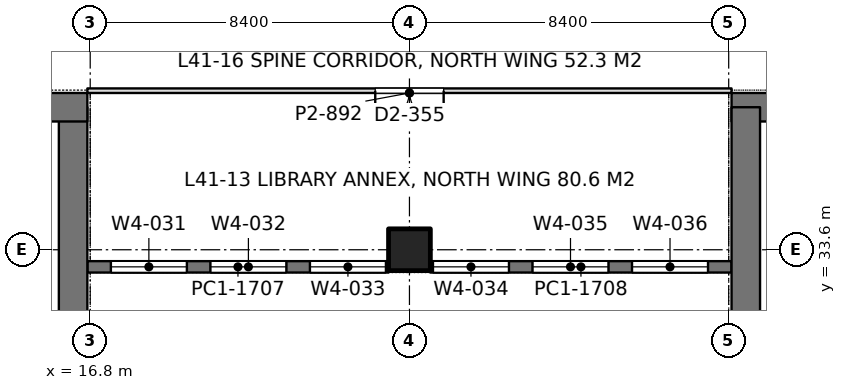
"""IFC4 building model, lengths in metres.
Left out: names, types, materials, properties, quantities, classifications, styles, units other than length and angle.
Written with IfcOpenShell. Run it as: python <this file> out.ifc"""

import sys

from ifc_helpers import new_model, si_unit, direction, frame, frame_2d, origin, origin_2d, place, context, subcontext, project, spatial, rectangle, extrude, element, fill, save


model = new_model("IFC4")
c1 = context("Model", 3, precision=1e-05, world=origin(), true_north=direction((0.0, 1.0)))
c2 = subcontext(c1, "Body", "Model", "MODEL_VIEW")
j1 = project(units=[si_unit("LENGTHUNIT", "METRE"), si_unit("PLANEANGLEUNIT", "RADIAN")], contexts=[c1])
p1 = place(None, origin())
s1 = spatial("IfcSite", under=j1, at=p1, CompositionType="ELEMENT")
p2 = place(p1, origin())
s2 = spatial("IfcBuilding", under=s1, at=p2, CompositionType="ELEMENT")
p3 = place(p2, frame((0.0, 0.0, 181.8)))
s3 = spatial("IfcBuildingStorey", under=s2, at=p3, CompositionType="ELEMENT", Elevation=181.8)
p4 = place(p3, frame((25.2, 33.6, 0.0), z_axis=(0.0, 0.0, 1.0), x_axis=(1.0, 0.0, 0.0)))
e1 = element("IfcColumn", 1, at=p4, inside=s3, PredefinedType="COLUMN", context=c2, shape_type="SweptSolid", body=[
    extrude(rectangle(XDim=1.1, YDim=1.1, at=origin_2d()), origin(), (0.0, 0.0, 1.0), 4.2),
])
p5 = place(p3, frame((-1.125, 37.35, 0.0), z_axis=(0.0, 0.0, 1.0), x_axis=(1.0, 0.0, 0.0)))
e2 = element("IfcWall", 2, at=p5, inside=s3, PredefinedType="SHEAR", context=c2, shape_type="SweptSolid", body=[
    extrude(rectangle(XDim=17.85, YDim=0.75, at=frame_2d((8.925, 0.0))), origin(), (0.0, 0.0, 1.0), 4.2),
])
p6 = place(p5, frame((8.875, 0.0, 0.0)))
e3 = element("IfcOpeningElement", 3, at=p6, cuts=e2, PredefinedType="OPENING", context=c2, shape_type="SweptSolid", body=[
    extrude(rectangle(XDim=1.8, YDim=2.4, at=frame_2d((0.9, 1.2))), frame((0.0, 0.385, 0.0), z_axis=(0.0, -1.0, 0.0), x_axis=(1.0, 0.0, 0.0)), (0.0, 0.0, 1.0), 0.77),
])
p7 = place(p3, frame((16.35, 27.8, 0.0), z_axis=(0.0, 0.0, 1.0), x_axis=(0.0, 1.0, 0.0)))
e4 = element("IfcWall", 4, at=p7, inside=s3, PredefinedType="SHEAR", context=c2, shape_type="SweptSolid", body=[
    extrude(rectangle(XDim=9.55, YDim=0.75, at=frame_2d((4.775, 0.0))), origin(), (0.0, 0.0, 1.0), 4.2),
])
p8 = place(p3, frame((33.675, 37.35, 0.0), z_axis=(0.0, 0.0, 1.0), x_axis=(1.0, 0.0, 0.0)))
e5 = element("IfcWall", 5, at=p8, inside=s3, PredefinedType="SHEAR", context=c2, shape_type="SweptSolid", body=[
    extrude(rectangle(XDim=17.85, YDim=0.75, at=frame_2d((8.925, 0.0))), origin(), (0.0, 0.0, 1.0), 4.2),
])
p9 = place(p8, frame((7.175, 0.0, 0.0)))
e6 = element("IfcOpeningElement", 6, at=p9, cuts=e5, PredefinedType="OPENING", context=c2, shape_type="SweptSolid", body=[
    extrude(rectangle(XDim=1.8, YDim=2.4, at=frame_2d((0.9, 1.2))), frame((0.0, 0.385, 0.0), z_axis=(0.0, -1.0, 0.0), x_axis=(1.0, 0.0, 0.0)), (0.0, 0.0, 1.0), 0.77),
])
p10 = place(p3, frame((34.05, 27.8, 0.0), z_axis=(0.0, 0.0, 1.0), x_axis=(0.0, 1.0, 0.0)))
e7 = element("IfcWall", 7, at=p10, inside=s3, PredefinedType="SHEAR", context=c2, shape_type="SweptSolid", body=[
    extrude(rectangle(XDim=9.55, YDim=0.75, at=frame_2d((4.775, 0.0))), origin(), (0.0, 0.0, 1.0), 4.2),
])
p11 = place(p3, frame((16.725, 33.15, 0.0), z_axis=(0.0, 0.0, 1.0), x_axis=(1.0, 0.0, 0.0)))
e8 = element("IfcWall", 8, at=p11, inside=s3, PredefinedType="SOLIDWALL", context=c2, shape_type="SweptSolid", body=[
    extrude(rectangle(XDim=7.925, YDim=0.3, at=frame_2d((3.962, 0.0))), origin(), (0.0, 0.0, 1.0), 4.05),
])
p12 = place(p11, frame((0.619, 0.0, 0.9)))
e9 = element("IfcOpeningElement", 9, at=p12, cuts=e8, PredefinedType="OPENING", context=c2, shape_type="SweptSolid", body=[
    extrude(rectangle(XDim=2.0, YDim=1.9, at=frame_2d((1.0, 0.95))), frame((0.0, 0.16, 0.0), z_axis=(0.0, -1.0, 0.0), x_axis=(1.0, 0.0, 0.0)), (0.0, 0.0, 1.0), 0.32),
])
p13 = place(p11, frame((3.238, 0.0, 0.9)))
e10 = element("IfcOpeningElement", 10, at=p13, cuts=e8, PredefinedType="OPENING", context=c2, shape_type="SweptSolid", body=[
    extrude(rectangle(XDim=2.0, YDim=1.9, at=frame_2d((1.0, 0.95))), frame((0.0, 0.16, 0.0), z_axis=(0.0, -1.0, 0.0), x_axis=(1.0, 0.0, 0.0)), (0.0, 0.0, 1.0), 0.32),
])
p14 = place(p11, frame((5.856, 0.0, 0.9)))
e11 = element("IfcOpeningElement", 11, at=p14, cuts=e8, PredefinedType="OPENING", context=c2, shape_type="SweptSolid", body=[
    extrude(rectangle(XDim=2.0, YDim=1.9, at=frame_2d((1.0, 0.95))), frame((0.0, 0.16, 0.0), z_axis=(0.0, -1.0, 0.0), x_axis=(1.0, 0.0, 0.0)), (0.0, 0.0, 1.0), 0.32),
])
p15 = place(p3, frame((25.75, 33.15, 0.0), z_axis=(0.0, 0.0, 1.0), x_axis=(1.0, 0.0, 0.0)))
e12 = element("IfcWall", 12, at=p15, inside=s3, PredefinedType="SOLIDWALL", context=c2, shape_type="SweptSolid", body=[
    extrude(rectangle(XDim=7.925, YDim=0.3, at=frame_2d((3.962, 0.0))), origin(), (0.0, 0.0, 1.0), 4.05),
])
p16 = place(p15, frame((0.069, 0.0, 0.9)))
e13 = element("IfcOpeningElement", 13, at=p16, cuts=e12, PredefinedType="OPENING", context=c2, shape_type="SweptSolid", body=[
    extrude(rectangle(XDim=2.0, YDim=1.9, at=frame_2d((1.0, 0.95))), frame((0.0, 0.16, 0.0), z_axis=(0.0, -1.0, 0.0), x_axis=(1.0, 0.0, 0.0)), (0.0, 0.0, 1.0), 0.32),
])
p17 = place(p15, frame((2.688, 0.0, 0.9)))
e14 = element("IfcOpeningElement", 14, at=p17, cuts=e12, PredefinedType="OPENING", context=c2, shape_type="SweptSolid", body=[
    extrude(rectangle(XDim=2.0, YDim=1.9, at=frame_2d((1.0, 0.95))), frame((0.0, 0.16, 0.0), z_axis=(0.0, -1.0, 0.0), x_axis=(1.0, 0.0, 0.0)), (0.0, 0.0, 1.0), 0.32),
])
p18 = place(p15, frame((5.306, 0.0, 0.9)))
e15 = element("IfcOpeningElement", 15, at=p18, cuts=e12, PredefinedType="OPENING", context=c2, shape_type="SweptSolid", body=[
    extrude(rectangle(XDim=2.0, YDim=1.9, at=frame_2d((1.0, 0.95))), frame((0.0, 0.16, 0.0), z_axis=(0.0, -1.0, 0.0), x_axis=(1.0, 0.0, 0.0)), (0.0, 0.0, 1.0), 0.32),
])
p19 = place(p3, frame((16.725, 37.785, 0.0), z_axis=(0.0, 0.0, 1.0), x_axis=(1.0, 0.0, 0.0)))
e16 = element("IfcWall", 16, at=p19, inside=s3, PredefinedType="PARTITIONING", context=c2, shape_type="SweptSolid", body=[
    extrude(rectangle(XDim=16.95, YDim=0.12, at=frame_2d((8.475, 0.0))), origin(), (0.0, 0.0, 1.0), 3.55),
])
p20 = place(p19, frame((7.575, 0.0, 0.0)))
e17 = element("IfcOpeningElement", 17, at=p20, cuts=e16, PredefinedType="OPENING", context=c2, shape_type="SweptSolid", body=[
    extrude(rectangle(XDim=1.8, YDim=2.2, at=frame_2d((0.9, 1.1))), frame((0.0, 0.07, 0.0), z_axis=(0.0, -1.0, 0.0), x_axis=(1.0, 0.0, 0.0)), (0.0, 0.0, 1.0), 0.14),
])
p21 = place(p12, origin())
e18 = element("IfcWindow", 18, at=p21, inside=s3, PartitioningType="SINGLE_PANEL", PredefinedType="WINDOW", context=c2, shape_type="SweptSolid", body=[
    extrude(rectangle(XDim=2.0, YDim=1.9, at=frame_2d((1.0, 0.95))), frame((0.0, 0.03, 0.0), z_axis=(0.0, -1.0, 0.0), x_axis=(1.0, 0.0, 0.0)), (0.0, 0.0, 1.0), 0.06),
])
fill(e9, e18)
p22 = place(p13, origin())
e19 = element("IfcWindow", 19, at=p22, inside=s3, PartitioningType="SINGLE_PANEL", PredefinedType="WINDOW", context=c2, shape_type="SweptSolid", body=[
    extrude(rectangle(XDim=2.0, YDim=1.9, at=frame_2d((1.0, 0.95))), frame((0.0, 0.03, 0.0), z_axis=(0.0, -1.0, 0.0), x_axis=(1.0, 0.0, 0.0)), (0.0, 0.0, 1.0), 0.06),
])
fill(e10, e19)
p23 = place(p14, origin())
e20 = element("IfcWindow", 20, at=p23, inside=s3, PartitioningType="SINGLE_PANEL", PredefinedType="WINDOW", context=c2, shape_type="SweptSolid", body=[
    extrude(rectangle(XDim=2.0, YDim=1.9, at=frame_2d((1.0, 0.95))), frame((0.0, 0.03, 0.0), z_axis=(0.0, -1.0, 0.0), x_axis=(1.0, 0.0, 0.0)), (0.0, 0.0, 1.0), 0.06),
])
fill(e11, e20)
p24 = place(p16, origin())
e21 = element("IfcWindow", 21, at=p24, inside=s3, PartitioningType="SINGLE_PANEL", PredefinedType="WINDOW", context=c2, shape_type="SweptSolid", body=[
    extrude(rectangle(XDim=2.0, YDim=1.9, at=frame_2d((1.0, 0.95))), frame((0.0, 0.03, 0.0), z_axis=(0.0, -1.0, 0.0), x_axis=(1.0, 0.0, 0.0)), (0.0, 0.0, 1.0), 0.06),
])
fill(e13, e21)
p25 = place(p17, origin())
e22 = element("IfcWindow", 22, at=p25, inside=s3, PartitioningType="SINGLE_PANEL", PredefinedType="WINDOW", context=c2, shape_type="SweptSolid", body=[
    extrude(rectangle(XDim=2.0, YDim=1.9, at=frame_2d((1.0, 0.95))), frame((0.0, 0.03, 0.0), z_axis=(0.0, -1.0, 0.0), x_axis=(1.0, 0.0, 0.0)), (0.0, 0.0, 1.0), 0.06),
])
fill(e14, e22)
p26 = place(p18, origin())
e23 = element("IfcWindow", 23, at=p26, inside=s3, PartitioningType="SINGLE_PANEL", PredefinedType="WINDOW", context=c2, shape_type="SweptSolid", body=[
    extrude(rectangle(XDim=2.0, YDim=1.9, at=frame_2d((1.0, 0.95))), frame((0.0, 0.03, 0.0), z_axis=(0.0, -1.0, 0.0), x_axis=(1.0, 0.0, 0.0)), (0.0, 0.0, 1.0), 0.06),
])
fill(e15, e23)
p27 = place(p20, frame((1.8, 0.0, 0.0), z_axis=(0.0, 0.0, 1.0), x_axis=(-1.0, 0.0, 0.0)))
e24 = element("IfcDoor", 24, at=p27, inside=s3, OperationType="DOUBLE_DOOR_SINGLE_SWING", PredefinedType="DOOR", context=c2, shape_type="SweptSolid", body=[
    extrude(rectangle(XDim=1.8, YDim=2.2, at=frame_2d((0.9, 1.1))), frame((0.0, 0.025, 0.0), z_axis=(0.0, -1.0, 0.0), x_axis=(1.0, 0.0, 0.0)), (0.0, 0.0, 1.0), 0.05),
])
fill(e17, e24)
save(model, sys.argv[1])
